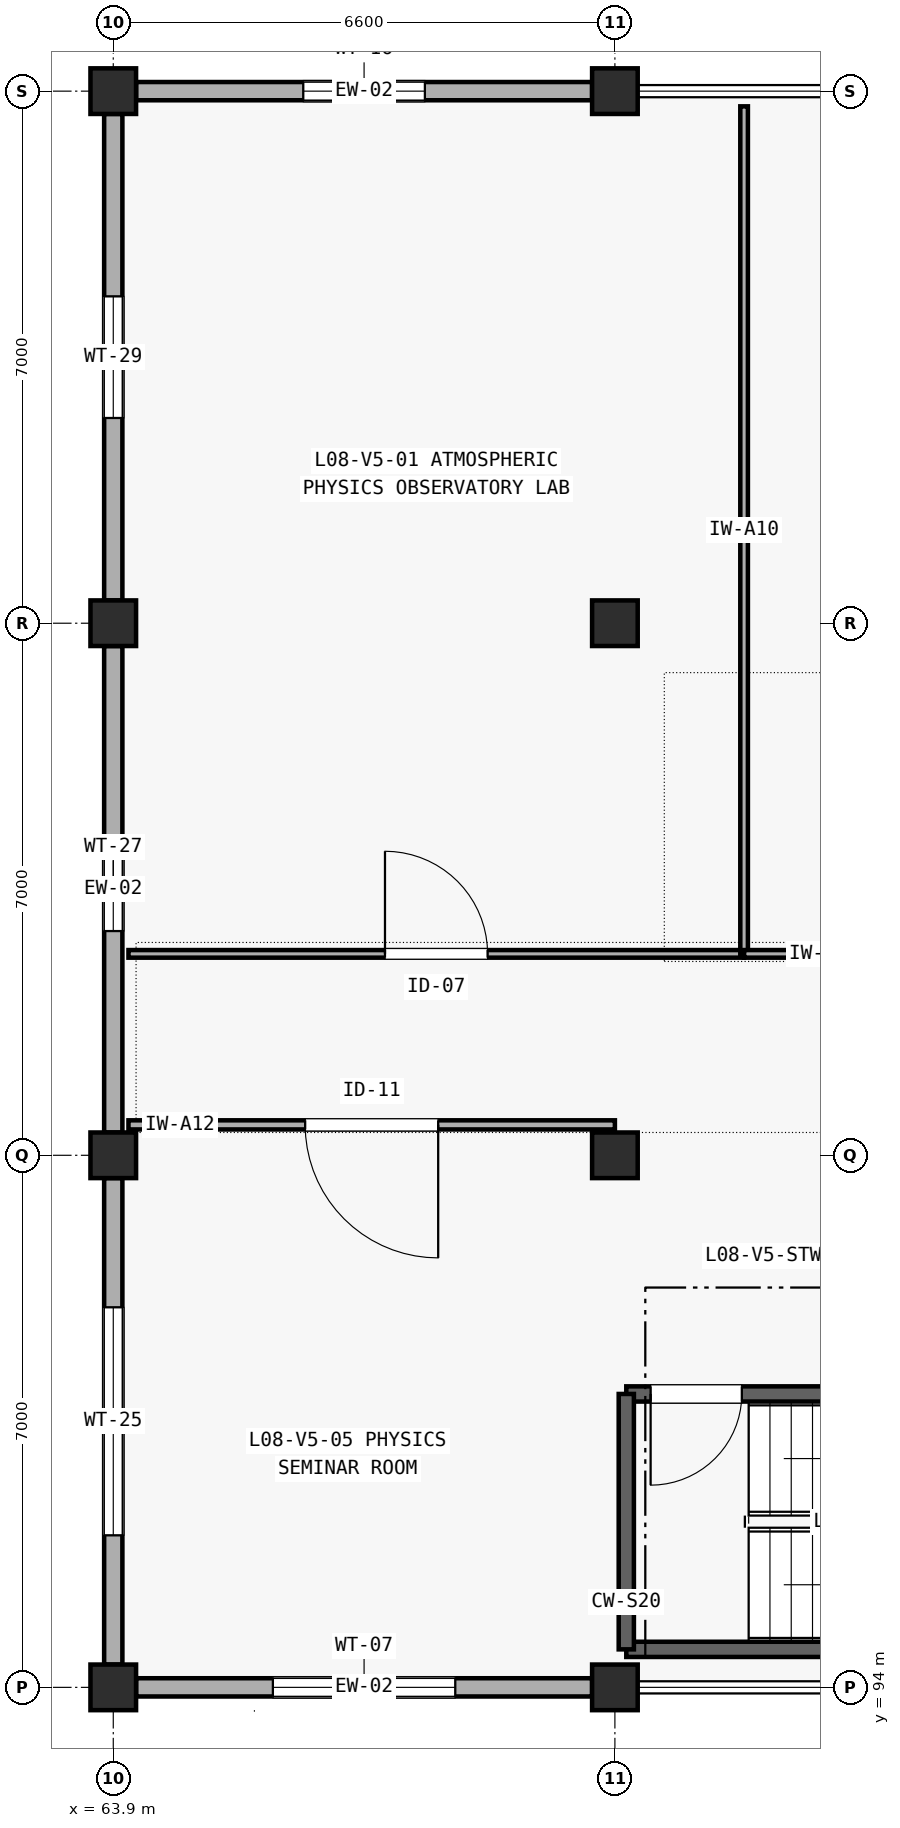
"""IFC4 building model, lengths in metres.
Left out: names, types, materials, properties, quantities, classifications, styles, units other than length and angle.
Written with IfcOpenShell. Run it as: python <this file> out.ifc"""

import sys

from ifc_helpers import new_model, si_unit, direction, frame, frame_2d, origin, origin_2d, place, context, subcontext, project, spatial, rectangle, extrude, element, fill, save


model = new_model("IFC4")
c1 = context("Model", 3, precision=1e-05, world=origin(), true_north=direction((0.0, 1.0)))
c2 = subcontext(c1, "Body", "Model", "MODEL_VIEW")
j1 = project(units=[si_unit("LENGTHUNIT", "METRE"), si_unit("PLANEANGLEUNIT", "RADIAN")], contexts=[c1])
p1 = place(None, origin())
s1 = spatial("IfcSite", under=j1, at=p1, CompositionType="ELEMENT")
p2 = place(p1, origin())
s2 = spatial("IfcBuilding", under=s1, at=p2, CompositionType="ELEMENT")
p3 = place(p2, frame((0.0, 0.0, 33.6)))
s3 = spatial("IfcBuildingStorey", under=s2, at=p3, CompositionType="ELEMENT", Elevation=33.6)
for number, where, z_axis, x_axis in (
    (1, (63.9, 94.0, 0.0), (0.0, 0.0, 1.0), (1.0, 0.0, 0.0)),
    (2, (63.9, 101.0, 0.0), (0.0, 0.0, 1.0), (1.0, 0.0, 0.0)),
    (3, (63.9, 108.0, 0.0), (0.0, 0.0, 1.0), (1.0, 0.0, 0.0)),
    (4, (63.9, 115.0, 0.0), (0.0, 0.0, 1.0), (1.0, 0.0, 0.0)),
    (5, (70.5, 94.0, 0.0), (0.0, 0.0, 1.0), (1.0, 0.0, 0.0)),
    (6, (70.5, 101.0, 0.0), (0.0, 0.0, 1.0), (1.0, 0.0, 0.0)),
    (7, (70.5, 108.0, 0.0), (0.0, 0.0, 1.0), (1.0, 0.0, 0.0)),
    (8, (70.5, 115.0, 0.0), (0.0, 0.0, 1.0), (1.0, 0.0, 0.0)),
):
    element("IfcColumn", number, at=place(p3, frame(where, z_axis=z_axis, x_axis=x_axis)), inside=s3, PredefinedType="COLUMN", context=c2, shape_type="SweptSolid", body=[
        extrude(rectangle(XDim=0.6, YDim=0.6, at=origin_2d()), origin(), (0.0, 0.0, 1.0), 4.2),
    ])
p4 = place(p3, frame((64.2, 94.0, 0.0), z_axis=(0.0, 0.0, 1.0), x_axis=(1.0, 0.0, 0.0)))
e9 = element("IfcWall", 9, at=p4, inside=s3, PredefinedType="SOLIDWALL", context=c2, shape_type="SweptSolid", body=[
    extrude(rectangle(XDim=6.0, YDim=0.24, at=frame_2d((3.0, 0.0))), origin(), (0.0, 0.0, 1.0), 3.235),
])
p5 = place(p4, frame((1.8, 0.0, 0.85)))
e10 = element("IfcOpeningElement", 10, at=p5, cuts=e9, PredefinedType="OPENING", context=c2, shape_type="SweptSolid", body=[
    extrude(rectangle(XDim=2.4, YDim=1.35, at=frame_2d((1.2, 0.675))), frame((0.0, 0.13, 0.0), z_axis=(0.0, -1.0, 0.0), x_axis=(1.0, 0.0, 0.0)), (0.0, 0.0, 1.0), 0.26),
])
p6 = place(p3, frame((64.2, 115.0, 0.0), z_axis=(0.0, 0.0, 1.0), x_axis=(1.0, 0.0, 0.0)))
e11 = element("IfcWall", 11, at=p6, inside=s3, PredefinedType="SOLIDWALL", context=c2, shape_type="SweptSolid", body=[
    extrude(rectangle(XDim=6.0, YDim=0.24, at=frame_2d((3.0, 0.0))), origin(), (0.0, 0.0, 1.0), 3.235),
])
p7 = place(p6, frame((2.2, 0.0, 0.85)))
e12 = element("IfcOpeningElement", 12, at=p7, cuts=e11, PredefinedType="OPENING", context=c2, shape_type="SweptSolid", body=[
    extrude(rectangle(XDim=1.6, YDim=1.25, at=frame_2d((0.8, 0.625))), frame((0.0, 0.13, 0.0), z_axis=(0.0, -1.0, 0.0), x_axis=(1.0, 0.0, 0.0)), (0.0, 0.0, 1.0), 0.26),
])
p8 = place(p3, frame((63.9, 94.3, 0.0), z_axis=(0.0, 0.0, 1.0), x_axis=(0.0, 1.0, 0.0)))
e13 = element("IfcWall", 13, at=p8, inside=s3, PredefinedType="SOLIDWALL", context=c2, shape_type="SweptSolid", body=[
    extrude(rectangle(XDim=6.4, YDim=0.24, at=frame_2d((3.2, 0.0))), origin(), (0.0, 0.0, 1.0), 3.505),
])
p9 = place(p8, frame((1.7, 0.0, 0.85)))
e14 = element("IfcOpeningElement", 14, at=p9, cuts=e13, PredefinedType="OPENING", context=c2, shape_type="SweptSolid", body=[
    extrude(rectangle(XDim=3.0, YDim=1.6, at=frame_2d((1.5, 0.8))), frame((0.0, 0.13, 0.0), z_axis=(0.0, -1.0, 0.0), x_axis=(1.0, 0.0, 0.0)), (0.0, 0.0, 1.0), 0.26),
])
p10 = place(p3, frame((63.9, 101.3, 0.0), z_axis=(0.0, 0.0, 1.0), x_axis=(0.0, 1.0, 0.0)))
e15 = element("IfcWall", 15, at=p10, inside=s3, PredefinedType="SOLIDWALL", context=c2, shape_type="SweptSolid", body=[
    extrude(rectangle(XDim=6.4, YDim=0.24, at=frame_2d((3.2, 0.0))), origin(), (0.0, 0.0, 1.0), 3.505),
])
p11 = place(p10, frame((2.65, 0.0, 0.85)))
e16 = element("IfcOpeningElement", 16, at=p11, cuts=e15, PredefinedType="OPENING", context=c2, shape_type="SweptSolid", body=[
    extrude(rectangle(XDim=1.1, YDim=1.45, at=frame_2d((0.55, 0.725))), frame((0.0, 0.13, 0.0), z_axis=(0.0, -1.0, 0.0), x_axis=(1.0, 0.0, 0.0)), (0.0, 0.0, 1.0), 0.26),
])
p12 = place(p3, frame((63.9, 108.3, 0.0), z_axis=(0.0, 0.0, 1.0), x_axis=(0.0, 1.0, 0.0)))
e17 = element("IfcWall", 17, at=p12, inside=s3, PredefinedType="SOLIDWALL", context=c2, shape_type="SweptSolid", body=[
    extrude(rectangle(XDim=6.4, YDim=0.24, at=frame_2d((3.2, 0.0))), origin(), (0.0, 0.0, 1.0), 3.505),
])
p13 = place(p12, frame((2.4, 0.0, 0.85)))
e18 = element("IfcOpeningElement", 18, at=p13, cuts=e17, PredefinedType="OPENING", context=c2, shape_type="SweptSolid", body=[
    extrude(rectangle(XDim=1.6, YDim=1.45, at=frame_2d((0.8, 0.725))), frame((0.0, 0.13, 0.0), z_axis=(0.0, -1.0, 0.0), x_axis=(1.0, 0.0, 0.0)), (0.0, 0.0, 1.0), 0.26),
])
p14 = place(p3, frame((70.65, 94.5, 0.0), z_axis=(0.0, 0.0, 1.0), x_axis=(1.0, 0.0, 0.0)))
e19 = element("IfcWall", 19, at=p14, inside=s3, PredefinedType="SHEAR", context=c2, shape_type="SweptSolid", body=[
    extrude(rectangle(XDim=6.3, YDim=0.2, at=frame_2d((3.15, 0.0))), origin(), (0.0, 0.0, 1.0), 4.2),
])
p15 = place(p3, frame((70.65, 97.86, 0.0), z_axis=(0.0, 0.0, 1.0), x_axis=(1.0, 0.0, 0.0)))
e20 = element("IfcWall", 20, at=p15, inside=s3, PredefinedType="SHEAR", context=c2, shape_type="SweptSolid", body=[
    extrude(rectangle(XDim=6.3, YDim=0.2, at=frame_2d((3.15, 0.0))), origin(), (0.0, 0.0, 1.0), 4.2),
])
p16 = place(p15, frame((0.32, 0.0, 0.0)))
e21 = element("IfcOpeningElement", 21, at=p16, cuts=e20, PredefinedType="OPENING", context=c2, shape_type="SweptSolid", body=[
    extrude(rectangle(XDim=1.2, YDim=2.15, at=frame_2d((0.6, 1.075))), frame((0.0, 0.11, 0.0), z_axis=(0.0, -1.0, 0.0), x_axis=(1.0, 0.0, 0.0)), (0.0, 0.0, 1.0), 0.22),
])
p17 = place(p3, frame((70.65, 94.5, 0.0), z_axis=(0.0, 0.0, 1.0), x_axis=(0.0, 1.0, 0.0)))
e22 = element("IfcWall", 22, at=p17, inside=s3, PredefinedType="SHEAR", context=c2, shape_type="SweptSolid", body=[
    extrude(rectangle(XDim=3.36, YDim=0.2, at=frame_2d((1.68, 0.0))), origin(), (0.0, 0.0, 1.0), 4.2),
])
p18 = place(p3, frame((64.1, 103.65, 0.0), z_axis=(0.0, 0.0, 1.0), x_axis=(1.0, 0.0, 0.0)))
e23 = element("IfcWall", 23, at=p18, inside=s3, PredefinedType="PARTITIONING", context=c2, shape_type="SweptSolid", body=[
    extrude(rectangle(XDim=8.1, YDim=0.1, at=frame_2d((4.05, 0.0))), origin(), (0.0, 0.0, 1.0), 3.9),
])
p19 = place(p18, frame((3.375, 0.0, 0.0)))
e24 = element("IfcOpeningElement", 24, at=p19, cuts=e23, PredefinedType="OPENING", context=c2, shape_type="SweptSolid", body=[
    extrude(rectangle(XDim=1.35, YDim=2.2, at=frame_2d((0.675, 1.1))), frame((0.0, 0.06, 0.0), z_axis=(0.0, -1.0, 0.0), x_axis=(1.0, 0.0, 0.0)), (0.0, 0.0, 1.0), 0.12),
])
p20 = place(p3, frame((72.2, 103.65, 0.0), z_axis=(0.0, 0.0, 1.0), x_axis=(0.0, 1.0, 0.0)))
e25 = element("IfcWall", 25, at=p20, inside=s3, PredefinedType="PARTITIONING", context=c2, shape_type="SweptSolid", body=[
    extrude(rectangle(XDim=11.15, YDim=0.1, at=frame_2d((5.575, 0.0))), origin(), (0.0, 0.0, 1.0), 3.9),
])
p21 = place(p3, frame((72.2, 103.65, 0.0), z_axis=(0.0, 0.0, 1.0), x_axis=(1.0, 0.0, 0.0)))
e26 = element("IfcWall", 26, at=p21, inside=s3, PredefinedType="PARTITIONING", context=c2, shape_type="SweptSolid", body=[
    extrude(rectangle(XDim=12.4, YDim=0.1, at=frame_2d((6.2, 0.0))), origin(), (0.0, 0.0, 1.0), 3.9),
])
p22 = place(p21, frame((5.475, 0.0, 0.0)))
e27 = element("IfcOpeningElement", 27, at=p22, cuts=e26, PredefinedType="OPENING", context=c2, shape_type="SweptSolid", body=[
    extrude(rectangle(XDim=1.45, YDim=2.2, at=frame_2d((0.725, 1.1))), frame((0.0, 0.06, 0.0), z_axis=(0.0, -1.0, 0.0), x_axis=(1.0, 0.0, 0.0)), (0.0, 0.0, 1.0), 0.12),
])
p23 = place(p3, frame((64.1, 101.4, 0.0), z_axis=(0.0, 0.0, 1.0), x_axis=(1.0, 0.0, 0.0)))
e28 = element("IfcWall", 28, at=p23, inside=s3, PredefinedType="PARTITIONING", context=c2, shape_type="SweptSolid", body=[
    extrude(rectangle(XDim=6.4, YDim=0.12, at=frame_2d((3.2, 0.0))), origin(), (0.0, 0.0, 1.0), 3.9),
])
p24 = place(p23, frame((2.325, 0.0, 0.0)))
e29 = element("IfcOpeningElement", 29, at=p24, cuts=e28, PredefinedType="OPENING", context=c2, shape_type="SweptSolid", body=[
    extrude(rectangle(XDim=1.75, YDim=2.25, at=frame_2d((0.875, 1.125))), frame((0.0, 0.07, 0.0), z_axis=(0.0, -1.0, 0.0), x_axis=(1.0, 0.0, 0.0)), (0.0, 0.0, 1.0), 0.14),
])
p25 = place(p5, origin())
e30 = element("IfcWindow", 30, at=p25, inside=s3, PartitioningType="SINGLE_PANEL", PredefinedType="WINDOW", context=c2, shape_type="SweptSolid", body=[
    extrude(rectangle(XDim=2.4, YDim=1.35, at=frame_2d((1.2, 0.675))), frame((0.0, 0.03, 0.0), z_axis=(0.0, -1.0, 0.0), x_axis=(1.0, 0.0, 0.0)), (0.0, 0.0, 1.0), 0.06),
])
fill(e10, e30)
p26 = place(p7, origin())
e31 = element("IfcWindow", 31, at=p26, inside=s3, PartitioningType="SINGLE_PANEL", PredefinedType="WINDOW", context=c2, shape_type="SweptSolid", body=[
    extrude(rectangle(XDim=1.6, YDim=1.25, at=frame_2d((0.8, 0.625))), frame((0.0, 0.03, 0.0), z_axis=(0.0, -1.0, 0.0), x_axis=(1.0, 0.0, 0.0)), (0.0, 0.0, 1.0), 0.06),
])
fill(e12, e31)
p27 = place(p9, origin())
e32 = element("IfcWindow", 32, at=p27, inside=s3, PartitioningType="SINGLE_PANEL", PredefinedType="WINDOW", context=c2, shape_type="SweptSolid", body=[
    extrude(rectangle(XDim=3.0, YDim=1.6, at=frame_2d((1.5, 0.8))), frame((0.0, 0.03, 0.0), z_axis=(0.0, -1.0, 0.0), x_axis=(1.0, 0.0, 0.0)), (0.0, 0.0, 1.0), 0.06),
])
fill(e14, e32)
p28 = place(p11, origin())
e33 = element("IfcWindow", 33, at=p28, inside=s3, PartitioningType="SINGLE_PANEL", PredefinedType="WINDOW", context=c2, shape_type="SweptSolid", body=[
    extrude(rectangle(XDim=1.1, YDim=1.45, at=frame_2d((0.55, 0.725))), frame((0.0, 0.03, 0.0), z_axis=(0.0, -1.0, 0.0), x_axis=(1.0, 0.0, 0.0)), (0.0, 0.0, 1.0), 0.06),
])
fill(e16, e33)
p29 = place(p13, origin())
e34 = element("IfcWindow", 34, at=p29, inside=s3, PartitioningType="SINGLE_PANEL", PredefinedType="WINDOW", context=c2, shape_type="SweptSolid", body=[
    extrude(rectangle(XDim=1.6, YDim=1.45, at=frame_2d((0.8, 0.725))), frame((0.0, 0.03, 0.0), z_axis=(0.0, -1.0, 0.0), x_axis=(1.0, 0.0, 0.0)), (0.0, 0.0, 1.0), 0.06),
])
fill(e18, e34)
p30 = place(p16, frame((1.2, 0.0, 0.0), z_axis=(0.0, 0.0, 1.0), x_axis=(-1.0, 0.0, 0.0)))
e35 = element("IfcDoor", 35, at=p30, inside=s3, OperationType="SINGLE_SWING_RIGHT", PredefinedType="DOOR", context=c2, shape_type="SweptSolid", body=[
    extrude(rectangle(XDim=1.2, YDim=2.15, at=frame_2d((0.6, 1.075))), frame((0.0, 0.025, 0.0), z_axis=(0.0, -1.0, 0.0), x_axis=(1.0, 0.0, 0.0)), (0.0, 0.0, 1.0), 0.05),
])
fill(e21, e35)
p31 = place(p19, origin())
e36 = element("IfcDoor", 36, at=p31, inside=s3, OperationType="SINGLE_SWING_LEFT", PredefinedType="DOOR", context=c2, shape_type="SweptSolid", body=[
    extrude(rectangle(XDim=1.35, YDim=2.2, at=frame_2d((0.675, 1.1))), frame((0.0, 0.025, 0.0), z_axis=(0.0, -1.0, 0.0), x_axis=(1.0, 0.0, 0.0)), (0.0, 0.0, 1.0), 0.05),
])
fill(e24, e36)
p32 = place(p24, frame((1.75, 0.0, 0.0), z_axis=(0.0, 0.0, 1.0), x_axis=(-1.0, 0.0, 0.0)))
e37 = element("IfcDoor", 37, at=p32, inside=s3, OperationType="SINGLE_SWING_LEFT", PredefinedType="DOOR", context=c2, shape_type="SweptSolid", body=[
    extrude(rectangle(XDim=1.75, YDim=2.25, at=frame_2d((0.875, 1.125))), frame((0.0, 0.025, 0.0), z_axis=(0.0, -1.0, 0.0), x_axis=(1.0, 0.0, 0.0)), (0.0, 0.0, 1.0), 0.05),
])
fill(e29, e37)
save(model, sys.argv[1])
